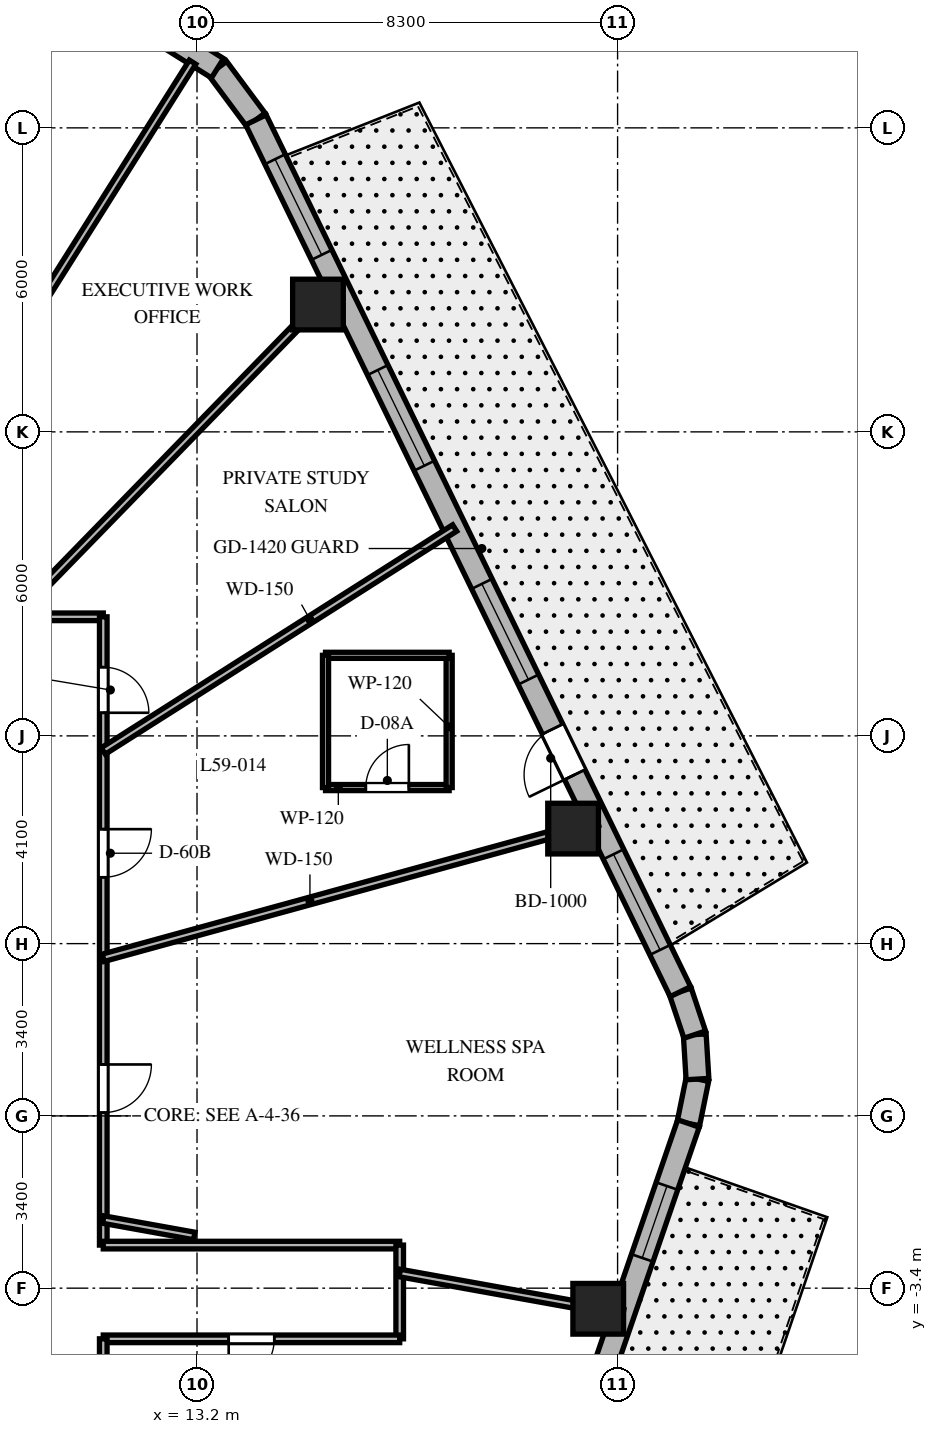
"""IFC4 building model, lengths in metres.
Left out: names, types, materials, properties, quantities, classifications, styles, units other than length and angle.
Written with IfcOpenShell. Run it as: python <this file> out.ifc"""

import sys

from ifc_helpers import new_model, si_unit, direction, frame, frame_2d, origin, origin_2d, place, context, subcontext, project, spatial, rectangle, extrude, element, fill, save


model = new_model("IFC4")
c1 = context("Model", 3, precision=1e-05, world=origin(), true_north=direction((0.0, 1.0)))
c2 = subcontext(c1, "Body", "Model", "MODEL_VIEW")
j1 = project(units=[si_unit("LENGTHUNIT", "METRE"), si_unit("PLANEANGLEUNIT", "RADIAN")], contexts=[c1])
p1 = place(None, origin())
s1 = spatial("IfcSite", under=j1, at=p1, CompositionType="ELEMENT")
p2 = place(p1, origin())
s2 = spatial("IfcBuilding", under=s1, at=p2, CompositionType="ELEMENT")
p3 = place(p2, frame((0.0, 0.0, 236.9)))
s3 = spatial("IfcBuildingStorey", under=s2, at=p3, CompositionType="ELEMENT", Elevation=236.9)
for number, where, z_axis, x_axis in (
    (1, (21.118, -3.807, 0.0), (0.0, 0.0, 1.0), (1.0, 0.0, 0.0)),
    (2, (20.622, 5.67, 0.0), (0.0, 0.0, 1.0), (1.0, 0.0, 0.0)),
    (3, (15.587, 16.013, 0.0), (0.0, 0.0, 1.0), (1.0, 0.0, 0.0)),
):
    element("IfcColumn", number, at=place(p3, frame(where, z_axis=z_axis, x_axis=x_axis)), inside=s3, PredefinedType="COLUMN", context=c2, shape_type="SweptSolid", body=[
        extrude(rectangle(XDim=1.0, YDim=1.0, at=origin_2d()), origin(), (0.0, 0.0, 1.0), 3.8),
    ])
p4 = place(p3, frame((22.898, -0.15, 0.0), z_axis=(0.0, 0.0, 1.0), x_axis=(0.199055826889, 0.979988151858, 0.0)))
e4 = element("IfcWall", 4, at=p4, inside=s3, PredefinedType="SOLIDWALL", context=c2, shape_type="SweptSolid", body=[
    extrude(rectangle(XDim=0.894, YDim=0.45, at=frame_2d((0.447, 0.0))), origin(), (0.0, 0.0, 1.0), 3.5),
])
p5 = place(p3, frame((23.076, 0.727, 0.0), z_axis=(0.0, 0.0, 1.0), x_axis=(-0.060805222108, 0.998149650586, 0.0)))
e5 = element("IfcWall", 5, at=p5, inside=s3, PredefinedType="SOLIDWALL", context=c2, shape_type="SweptSolid", body=[
    extrude(rectangle(XDim=0.879, YDim=0.45, at=frame_2d((0.44, 0.0))), origin(), (0.0, 0.0, 1.0), 3.5),
])
p6 = place(p3, frame((23.023, 1.604, 0.0), z_axis=(0.0, 0.0, 1.0), x_axis=(-0.316801227695, 0.948491951537, 0.0)))
e6 = element("IfcWall", 6, at=p6, inside=s3, PredefinedType="SOLIDWALL", context=c2, shape_type="SweptSolid", body=[
    extrude(rectangle(XDim=0.894, YDim=0.45, at=frame_2d((0.447, 0.0))), origin(), (0.0, 0.0, 1.0), 3.5),
])
p7 = place(p3, frame((14.362, 19.658, 0.0), z_axis=(0.0, 0.0, 1.0), x_axis=(-0.596642462792, 0.80250717853, 0.0)))
e7 = element("IfcWall", 7, at=p7, inside=s3, PredefinedType="SOLIDWALL", context=c2, shape_type="SweptSolid", body=[
    extrude(rectangle(XDim=1.27, YDim=0.45, at=frame_2d((0.635, 0.0))), origin(), (0.0, 0.0, 1.0), 3.5),
])
p8 = place(p3, frame((13.604, 20.678, 0.0), z_axis=(0.0, 0.0, 1.0), x_axis=(-0.847910404124, 0.53013955387, 0.0)))
e8 = element("IfcWall", 8, at=p8, inside=s3, PredefinedType="SOLIDWALL", context=c2, shape_type="SweptSolid", body=[
    extrude(rectangle(XDim=1.249, YDim=0.45, at=frame_2d((0.624, 0.0))), origin(), (0.0, 0.0, 1.0), 3.5),
])
p9 = place(p3, frame((16.324, -19.275, 0.0), z_axis=(0.0, 0.0, 1.0), x_axis=(0.325083142304, 0.945685439557, 0.0)))
e9 = element("IfcWall", 9, at=p9, inside=s3, PredefinedType="SOLIDWALL", context=c2, shape_type="SweptSolid", body=[
    extrude(rectangle(XDim=20.224, YDim=0.45, at=frame_2d((10.112, 0.0))), origin(), (0.0, 0.0, 1.0), 3.5),
])
p10 = place(p9, frame((5.062, 0.0, 0.0)))
e10 = element("IfcOpeningElement", 10, at=p10, cuts=e9, PredefinedType="OPENING", context=c2, shape_type="SweptSolid", body=[
    extrude(rectangle(XDim=0.95, YDim=2.15, at=frame_2d((0.475, 1.075))), frame((0.0, 0.235, 0.0), z_axis=(0.0, -1.0, 0.0), x_axis=(1.0, 0.0, 0.0)), (0.0, 0.0, 1.0), 0.47),
])
p11 = place(p9, frame((1.253, 0.0, 0.8)))
e11 = element("IfcOpeningElement", 11, at=p11, cuts=e9, PredefinedType="OPENING", context=c2, shape_type="SweptSolid", body=[
    extrude(rectangle(XDim=1.5, YDim=1.8, at=frame_2d((0.75, 0.9))), frame((0.0, 0.235, 0.0), z_axis=(0.0, -1.0, 0.0), x_axis=(1.0, 0.0, 0.0)), (0.0, 0.0, 1.0), 0.47),
])
p12 = place(p9, frame((6.904, 0.0, 0.8)))
e12 = element("IfcOpeningElement", 12, at=p12, cuts=e9, PredefinedType="OPENING", context=c2, shape_type="SweptSolid", body=[
    extrude(rectangle(XDim=1.5, YDim=1.8, at=frame_2d((0.75, 0.9))), frame((0.0, 0.235, 0.0), z_axis=(0.0, -1.0, 0.0), x_axis=(1.0, 0.0, 0.0)), (0.0, 0.0, 1.0), 0.47),
])
p13 = place(p9, frame((11.885, 0.0, 0.8)))
e13 = element("IfcOpeningElement", 13, at=p13, cuts=e9, PredefinedType="OPENING", context=c2, shape_type="SweptSolid", body=[
    extrude(rectangle(XDim=1.5, YDim=1.8, at=frame_2d((0.75, 0.9))), frame((0.0, 0.235, 0.0), z_axis=(0.0, -1.0, 0.0), x_axis=(1.0, 0.0, 0.0)), (0.0, 0.0, 1.0), 0.47),
])
p14 = place(p9, frame((17.418, 0.0, 0.8)))
e14 = element("IfcOpeningElement", 14, at=p14, cuts=e9, PredefinedType="OPENING", context=c2, shape_type="SweptSolid", body=[
    extrude(rectangle(XDim=1.5, YDim=1.8, at=frame_2d((0.75, 0.9))), frame((0.0, 0.235, 0.0), z_axis=(0.0, -1.0, 0.0), x_axis=(1.0, 0.0, 0.0)), (0.0, 0.0, 1.0), 0.47),
])
p15 = place(p3, frame((22.74, 2.452, 0.0), z_axis=(0.0, 0.0, 1.0), x_axis=(-0.437753424814, 0.899095066755, 0.0)))
e15 = element("IfcWall", 15, at=p15, inside=s3, PredefinedType="SOLIDWALL", context=c2, shape_type="SweptSolid", body=[
    extrude(rectangle(XDim=19.137, YDim=0.45, at=frame_2d((9.569, 0.0))), origin(), (0.0, 0.0, 1.0), 3.5),
])
p16 = place(p15, frame((4.763, 0.0, 0.0)))
e16 = element("IfcOpeningElement", 16, at=p16, cuts=e15, PredefinedType="OPENING", context=c2, shape_type="SweptSolid", body=[
    extrude(rectangle(XDim=1.0, YDim=2.15, at=frame_2d((0.5, 1.075))), frame((0.0, 0.235, 0.0), z_axis=(0.0, -1.0, 0.0), x_axis=(1.0, 0.0, 0.0)), (0.0, 0.0, 1.0), 0.47),
])
p17 = place(p15, frame((6.851, 0.0, 0.8)))
e17 = element("IfcOpeningElement", 17, at=p17, cuts=e15, PredefinedType="OPENING", context=c2, shape_type="SweptSolid", body=[
    extrude(rectangle(XDim=2.1, YDim=1.85, at=frame_2d((1.05, 0.925))), frame((0.0, 0.235, 0.0), z_axis=(0.0, -1.0, 0.0), x_axis=(1.0, 0.0, 0.0)), (0.0, 0.0, 1.0), 0.47),
])
p18 = place(p15, frame((11.545, 0.0, 0.8)))
e18 = element("IfcOpeningElement", 18, at=p18, cuts=e15, PredefinedType="OPENING", context=c2, shape_type="SweptSolid", body=[
    extrude(rectangle(XDim=2.1, YDim=1.85, at=frame_2d((1.05, 0.925))), frame((0.0, 0.235, 0.0), z_axis=(0.0, -1.0, 0.0), x_axis=(1.0, 0.0, 0.0)), (0.0, 0.0, 1.0), 0.47),
])
p19 = place(p15, frame((16.173, 0.0, 0.8)))
e19 = element("IfcOpeningElement", 19, at=p19, cuts=e15, PredefinedType="OPENING", context=c2, shape_type="SweptSolid", body=[
    extrude(rectangle(XDim=2.1, YDim=1.85, at=frame_2d((1.05, 0.925))), frame((0.0, 0.235, 0.0), z_axis=(0.0, -1.0, 0.0), x_axis=(1.0, 0.0, 0.0)), (0.0, 0.0, 1.0), 0.47),
])
p20 = place(p15, frame((0.916, 0.0, 0.8)))
e20 = element("IfcOpeningElement", 20, at=p20, cuts=e15, PredefinedType="OPENING", context=c2, shape_type="SweptSolid", body=[
    extrude(rectangle(XDim=2.1, YDim=1.85, at=frame_2d((1.05, 0.925))), frame((0.0, 0.235, 0.0), z_axis=(0.0, -1.0, 0.0), x_axis=(1.0, 0.0, 0.0)), (0.0, 0.0, 1.0), 0.47),
])
p21 = place(p3, frame((0.92, 9.85, 0.0), z_axis=(0.0, 0.0, 1.0), x_axis=(1.0, 0.0, 0.0)))
e21 = element("IfcWall", 21, at=p21, inside=s3, PredefinedType="PARTITIONING", context=c2, shape_type="SweptSolid", body=[
    extrude(rectangle(XDim=10.43, YDim=0.15, at=frame_2d((5.215, 0.0))), origin(), (0.0, 0.0, 1.0), 2.99),
])
p22 = place(p21, frame((6.577, 0.0, 0.0)))
e22 = element("IfcOpeningElement", 22, at=p22, cuts=e21, PredefinedType="OPENING", context=c2, shape_type="SweptSolid", body=[
    extrude(rectangle(XDim=0.9, YDim=2.03, at=frame_2d((0.45, 1.015))), frame((0.0, 0.085, 0.0), z_axis=(0.0, -1.0, 0.0), x_axis=(1.0, 0.0, 0.0)), (0.0, 0.0, 1.0), 0.17),
])
p23 = place(p21, frame((3.234, 0.0, 0.0)))
e23 = element("IfcOpeningElement", 23, at=p23, cuts=e21, PredefinedType="OPENING", context=c2, shape_type="SweptSolid", body=[
    extrude(rectangle(XDim=0.95, YDim=2.03, at=frame_2d((0.475, 1.015))), frame((0.0, 0.085, 0.0), z_axis=(0.0, -1.0, 0.0), x_axis=(1.0, 0.0, 0.0)), (0.0, 0.0, 1.0), 0.17),
])
p24 = place(p3, frame((11.35, 9.85, 0.0), z_axis=(0.0, 0.0, 1.0), x_axis=(0.0, -1.0, 0.0)))
e24 = element("IfcWall", 24, at=p24, inside=s3, PredefinedType="PARTITIONING", context=c2, shape_type="SweptSolid", body=[
    extrude(rectangle(XDim=12.4, YDim=0.15, at=frame_2d((6.2, 0.0))), origin(), (0.0, 0.0, 1.0), 2.99),
])
p25 = place(p24, frame((4.191, 0.0, 0.0)))
e25 = element("IfcOpeningElement", 25, at=p25, cuts=e24, PredefinedType="OPENING", context=c2, shape_type="SweptSolid", body=[
    extrude(rectangle(XDim=0.95, YDim=2.03, at=frame_2d((0.475, 1.015))), frame((0.0, 0.085, 0.0), z_axis=(0.0, -1.0, 0.0), x_axis=(1.0, 0.0, 0.0)), (0.0, 0.0, 1.0), 0.17),
])
p26 = place(p24, frame((0.994, 0.0, 0.0)))
e26 = element("IfcOpeningElement", 26, at=p26, cuts=e24, PredefinedType="OPENING", context=c2, shape_type="SweptSolid", body=[
    extrude(rectangle(XDim=0.9, YDim=2.03, at=frame_2d((0.45, 1.015))), frame((0.0, 0.085, 0.0), z_axis=(0.0, -1.0, 0.0), x_axis=(1.0, 0.0, 0.0)), (0.0, 0.0, 1.0), 0.17),
])
p27 = place(p24, frame((8.835, 0.0, 0.0)))
e27 = element("IfcOpeningElement", 27, at=p27, cuts=e24, PredefinedType="OPENING", context=c2, shape_type="SweptSolid", body=[
    extrude(rectangle(XDim=0.95, YDim=2.03, at=frame_2d((0.475, 1.015))), frame((0.0, 0.085, 0.0), z_axis=(0.0, -1.0, 0.0), x_axis=(1.0, 0.0, 0.0)), (0.0, 0.0, 1.0), 0.17),
])
p28 = place(p3, frame((11.35, -2.55, 0.0), z_axis=(0.0, 0.0, 1.0), x_axis=(1.0, 0.0, 0.0)))
e28 = element("IfcWall", 28, at=p28, inside=s3, PredefinedType="PARTITIONING", context=c2, shape_type="SweptSolid", body=[
    extrude(rectangle(XDim=5.85, YDim=0.15, at=frame_2d((2.925, 0.0))), origin(), (0.0, 0.0, 1.0), 2.941),
])
p29 = place(p3, frame((17.2, -2.55, 0.0), z_axis=(0.0, 0.0, 1.0), x_axis=(0.0, -1.0, 0.0)))
e29 = element("IfcWall", 29, at=p29, inside=s3, PredefinedType="PARTITIONING", context=c2, shape_type="SweptSolid", body=[
    extrude(rectangle(XDim=1.85, YDim=0.15, at=frame_2d((0.925, 0.0))), origin(), (0.0, 0.0, 1.0), 2.941),
])
p30 = place(p3, frame((17.2, -4.4, 0.0), z_axis=(0.0, 0.0, 1.0), x_axis=(-1.0, 0.0, 0.0)))
e30 = element("IfcWall", 30, at=p30, inside=s3, PredefinedType="PARTITIONING", context=c2, shape_type="SweptSolid", body=[
    extrude(rectangle(XDim=5.85, YDim=0.15, at=frame_2d((2.925, 0.0))), origin(), (0.0, 0.0, 1.0), 2.941),
])
p31 = place(p30, frame((2.475, 0.0, 0.0)))
e31 = element("IfcOpeningElement", 31, at=p31, cuts=e30, PredefinedType="OPENING", context=c2, shape_type="SweptSolid", body=[
    extrude(rectangle(XDim=0.9, YDim=2.03, at=frame_2d((0.45, 1.015))), frame((0.0, 0.085, 0.0), z_axis=(0.0, -1.0, 0.0), x_axis=(1.0, 0.0, 0.0)), (0.0, 0.0, 1.0), 0.17),
])
p32 = place(p3, frame((11.35, -4.4, 0.0), z_axis=(0.0, 0.0, 1.0), x_axis=(0.0, -1.0, 0.0)))
e32 = element("IfcWall", 32, at=p32, inside=s3, PredefinedType="PARTITIONING", context=c2, shape_type="SweptSolid", body=[
    extrude(rectangle(XDim=5.45, YDim=0.15, at=frame_2d((2.725, 0.0))), origin(), (0.0, 0.0, 1.0), 2.99),
])
p33 = place(p32, frame((2.955, 0.0, 0.0)))
e33 = element("IfcOpeningElement", 33, at=p33, cuts=e32, PredefinedType="OPENING", context=c2, shape_type="SweptSolid", body=[
    extrude(rectangle(XDim=0.9, YDim=2.03, at=frame_2d((0.45, 1.015))), frame((0.0, 0.085, 0.0), z_axis=(0.0, -1.0, 0.0), x_axis=(1.0, 0.0, 0.0)), (0.0, 0.0, 1.0), 0.17),
])
p34 = place(p3, frame((11.35, 3.121, 0.0), z_axis=(0.0, 0.0, 1.0), x_axis=(0.964212793822, 0.265129568758, 0.0)))
e34 = element("IfcWall", 34, at=p34, inside=s3, PredefinedType="PARTITIONING", context=c2, shape_type="SweptSolid", body=[
    extrude(rectangle(XDim=10.12, YDim=0.15, at=frame_2d((5.06, 0.0))), origin(), (0.0, 0.0, 1.0), 2.74),
])
p35 = place(p3, frame((11.35, 7.202, 0.0), z_axis=(0.0, 0.0, 1.0), x_axis=(0.844364592263, 0.535769013039, 0.0)))
e35 = element("IfcWall", 35, at=p35, inside=s3, PredefinedType="PARTITIONING", context=c2, shape_type="SweptSolid", body=[
    extrude(rectangle(XDim=8.213, YDim=0.15, at=frame_2d((4.106, 0.0))), origin(), (0.0, 0.0, 1.0), 2.74),
])
p36 = place(p3, frame((9.588, 9.85, 0.0), z_axis=(0.0, 0.0, 1.0), x_axis=(0.697519469595, 0.716565830567, 0.0)))
e36 = element("IfcWall", 36, at=p36, inside=s3, PredefinedType="PARTITIONING", context=c2, shape_type="SweptSolid", body=[
    extrude(rectangle(XDim=9.126, YDim=0.15, at=frame_2d((4.563, 0.0))), origin(), (0.0, 0.0, 1.0), 2.74),
])
p37 = place(p3, frame((6.21, 9.85, 0.0), z_axis=(0.0, 0.0, 1.0), x_axis=(0.533335553786, 0.84590376939, 0.0)))
e37 = element("IfcWall", 37, at=p37, inside=s3, PredefinedType="PARTITIONING", context=c2, shape_type="SweptSolid", body=[
    extrude(rectangle(XDim=12.941, YDim=0.15, at=frame_2d((6.47, 0.0))), origin(), (0.0, 0.0, 1.0), 2.74),
])
p38 = place(p3, frame((11.35, -2.046, 0.0), z_axis=(0.0, 0.0, 1.0), x_axis=(0.984127783205, -0.177461281195, 0.0)))
e38 = element("IfcWall", 38, at=p38, inside=s3, PredefinedType="PARTITIONING", context=c2, shape_type="SweptSolid", body=[
    extrude(rectangle(XDim=1.826, YDim=0.15, at=frame_2d((0.913, 0.0))), origin(), (0.0, 0.0, 1.0), 3.5),
])
p39 = place(p3, frame((17.2, -3.101, 0.0), z_axis=(0.0, 0.0, 1.0), x_axis=(0.98413465883, -0.177423147559, 0.0)))
e39 = element("IfcWall", 39, at=p39, inside=s3, PredefinedType="PARTITIONING", context=c2, shape_type="SweptSolid", body=[
    extrude(rectangle(XDim=4.482, YDim=0.15, at=frame_2d((2.241, 0.0))), origin(), (0.0, 0.0, 1.0), 2.74),
])
p40 = place(p3, frame((15.736, 6.48, 0.0), z_axis=(0.0, 0.0, 1.0), x_axis=(1.0, 0.0, 0.0)))
e40 = element("IfcWall", 40, at=p40, inside=s3, PredefinedType="PARTITIONING", context=c2, shape_type="SweptSolid", body=[
    extrude(rectangle(XDim=2.44, YDim=0.12, at=frame_2d((1.22, 0.0))), origin(), (0.0, 0.0, 1.0), 2.99),
])
p41 = place(p40, frame((0.795, 0.0, 0.0)))
e41 = element("IfcOpeningElement", 41, at=p41, cuts=e40, PredefinedType="OPENING", context=c2, shape_type="SweptSolid", body=[
    extrude(rectangle(XDim=0.85, YDim=2.03, at=frame_2d((0.425, 1.015))), frame((0.0, 0.07, 0.0), z_axis=(0.0, -1.0, 0.0), x_axis=(1.0, 0.0, 0.0)), (0.0, 0.0, 1.0), 0.14),
])
p42 = place(p3, frame((18.176, 6.48, 0.0), z_axis=(0.0, 0.0, 1.0), x_axis=(0.0, 1.0, 0.0)))
e42 = element("IfcWall", 42, at=p42, inside=s3, PredefinedType="PARTITIONING", context=c2, shape_type="SweptSolid", body=[
    extrude(rectangle(XDim=2.61, YDim=0.12, at=frame_2d((1.305, 0.0))), origin(), (0.0, 0.0, 1.0), 3.5),
])
p43 = place(p3, frame((18.176, 9.09, 0.0), z_axis=(0.0, 0.0, 1.0), x_axis=(-1.0, 0.0, 0.0)))
e43 = element("IfcWall", 43, at=p43, inside=s3, PredefinedType="PARTITIONING", context=c2, shape_type="SweptSolid", body=[
    extrude(rectangle(XDim=2.44, YDim=0.12, at=frame_2d((1.22, 0.0))), origin(), (0.0, 0.0, 1.0), 3.5),
])
p44 = place(p3, frame((15.736, 9.09, 0.0), z_axis=(0.0, 0.0, 1.0), x_axis=(0.0, -1.0, 0.0)))
e44 = element("IfcWall", 44, at=p44, inside=s3, PredefinedType="PARTITIONING", context=c2, shape_type="SweptSolid", body=[
    extrude(rectangle(XDim=2.61, YDim=0.12, at=frame_2d((1.305, 0.0))), origin(), (0.0, 0.0, 1.0), 2.99),
])
p45 = place(p14, origin())
e45 = element("IfcWindow", 45, at=p45, inside=s3, PartitioningType="SINGLE_PANEL", PredefinedType="WINDOW", context=c2, shape_type="SweptSolid", body=[
    extrude(rectangle(XDim=1.5, YDim=1.8, at=frame_2d((0.75, 0.9))), frame((0.0, 0.03, 0.0), z_axis=(0.0, -1.0, 0.0), x_axis=(1.0, 0.0, 0.0)), (0.0, 0.0, 1.0), 0.06),
])
fill(e14, e45)
p46 = place(p16, origin())
e46 = element("IfcDoor", 46, at=p46, inside=s3, OperationType="SINGLE_SWING_LEFT", PredefinedType="DOOR", context=c2, shape_type="SweptSolid", body=[
    extrude(rectangle(XDim=1.0, YDim=2.15, at=frame_2d((0.5, 1.075))), frame((0.0, 0.025, 0.0), z_axis=(0.0, -1.0, 0.0), x_axis=(1.0, 0.0, 0.0)), (0.0, 0.0, 1.0), 0.05),
])
fill(e16, e46)
p47 = place(p17, origin())
e47 = element("IfcWindow", 47, at=p47, inside=s3, PartitioningType="SINGLE_PANEL", PredefinedType="WINDOW", context=c2, shape_type="SweptSolid", body=[
    extrude(rectangle(XDim=2.1, YDim=1.85, at=frame_2d((1.05, 0.925))), frame((0.0, 0.03, 0.0), z_axis=(0.0, -1.0, 0.0), x_axis=(1.0, 0.0, 0.0)), (0.0, 0.0, 1.0), 0.06),
])
fill(e17, e47)
p48 = place(p18, origin())
e48 = element("IfcWindow", 48, at=p48, inside=s3, PartitioningType="SINGLE_PANEL", PredefinedType="WINDOW", context=c2, shape_type="SweptSolid", body=[
    extrude(rectangle(XDim=2.1, YDim=1.85, at=frame_2d((1.05, 0.925))), frame((0.0, 0.03, 0.0), z_axis=(0.0, -1.0, 0.0), x_axis=(1.0, 0.0, 0.0)), (0.0, 0.0, 1.0), 0.06),
])
fill(e18, e48)
p49 = place(p19, origin())
e49 = element("IfcWindow", 49, at=p49, inside=s3, PartitioningType="SINGLE_PANEL", PredefinedType="WINDOW", context=c2, shape_type="SweptSolid", body=[
    extrude(rectangle(XDim=2.1, YDim=1.85, at=frame_2d((1.05, 0.925))), frame((0.0, 0.03, 0.0), z_axis=(0.0, -1.0, 0.0), x_axis=(1.0, 0.0, 0.0)), (0.0, 0.0, 1.0), 0.06),
])
fill(e19, e49)
p50 = place(p20, origin())
e50 = element("IfcWindow", 50, at=p50, inside=s3, PartitioningType="SINGLE_PANEL", PredefinedType="WINDOW", context=c2, shape_type="SweptSolid", body=[
    extrude(rectangle(XDim=2.1, YDim=1.85, at=frame_2d((1.05, 0.925))), frame((0.0, 0.03, 0.0), z_axis=(0.0, -1.0, 0.0), x_axis=(1.0, 0.0, 0.0)), (0.0, 0.0, 1.0), 0.06),
])
fill(e20, e50)
p51 = place(p25, origin())
e51 = element("IfcDoor", 51, at=p51, inside=s3, OperationType="SINGLE_SWING_LEFT", PredefinedType="DOOR", context=c2, shape_type="SweptSolid", body=[
    extrude(rectangle(XDim=0.95, YDim=2.03, at=frame_2d((0.475, 1.015))), frame((0.0, 0.025, 0.0), z_axis=(0.0, -1.0, 0.0), x_axis=(1.0, 0.0, 0.0)), (0.0, 0.0, 1.0), 0.05),
])
fill(e25, e51)
p52 = place(p41, origin())
e52 = element("IfcDoor", 52, at=p52, inside=s3, OperationType="SINGLE_SWING_RIGHT", PredefinedType="DOOR", context=c2, shape_type="SweptSolid", body=[
    extrude(rectangle(XDim=0.85, YDim=2.03, at=frame_2d((0.425, 1.015))), frame((0.0, 0.025, 0.0), z_axis=(0.0, -1.0, 0.0), x_axis=(1.0, 0.0, 0.0)), (0.0, 0.0, 1.0), 0.05),
])
fill(e41, e52)
p53 = place(p26, origin())
e53 = element("IfcDoor", 53, at=p53, inside=s3, OperationType="SINGLE_SWING_RIGHT", PredefinedType="DOOR", context=c2, shape_type="SweptSolid", body=[
    extrude(rectangle(XDim=0.9, YDim=2.03, at=frame_2d((0.45, 1.015))), frame((0.0, 0.025, 0.0), z_axis=(0.0, -1.0, 0.0), x_axis=(1.0, 0.0, 0.0)), (0.0, 0.0, 1.0), 0.05),
])
fill(e26, e53)
p54 = place(p31, origin())
e54 = element("IfcDoor", 54, at=p54, inside=s3, OperationType="SINGLE_SWING_RIGHT", PredefinedType="DOOR", context=c2, shape_type="SweptSolid", body=[
    extrude(rectangle(XDim=0.9, YDim=2.03, at=frame_2d((0.45, 1.015))), frame((0.0, 0.025, 0.0), z_axis=(0.0, -1.0, 0.0), x_axis=(1.0, 0.0, 0.0)), (0.0, 0.0, 1.0), 0.05),
])
fill(e31, e54)
p55 = place(p27, origin())
e55 = element("IfcDoor", 55, at=p55, inside=s3, OperationType="SINGLE_SWING_LEFT", PredefinedType="DOOR", context=c2, shape_type="SweptSolid", body=[
    extrude(rectangle(XDim=0.95, YDim=2.03, at=frame_2d((0.475, 1.015))), frame((0.0, 0.025, 0.0), z_axis=(0.0, -1.0, 0.0), x_axis=(1.0, 0.0, 0.0)), (0.0, 0.0, 1.0), 0.05),
])
fill(e27, e55)
save(model, sys.argv[1])
